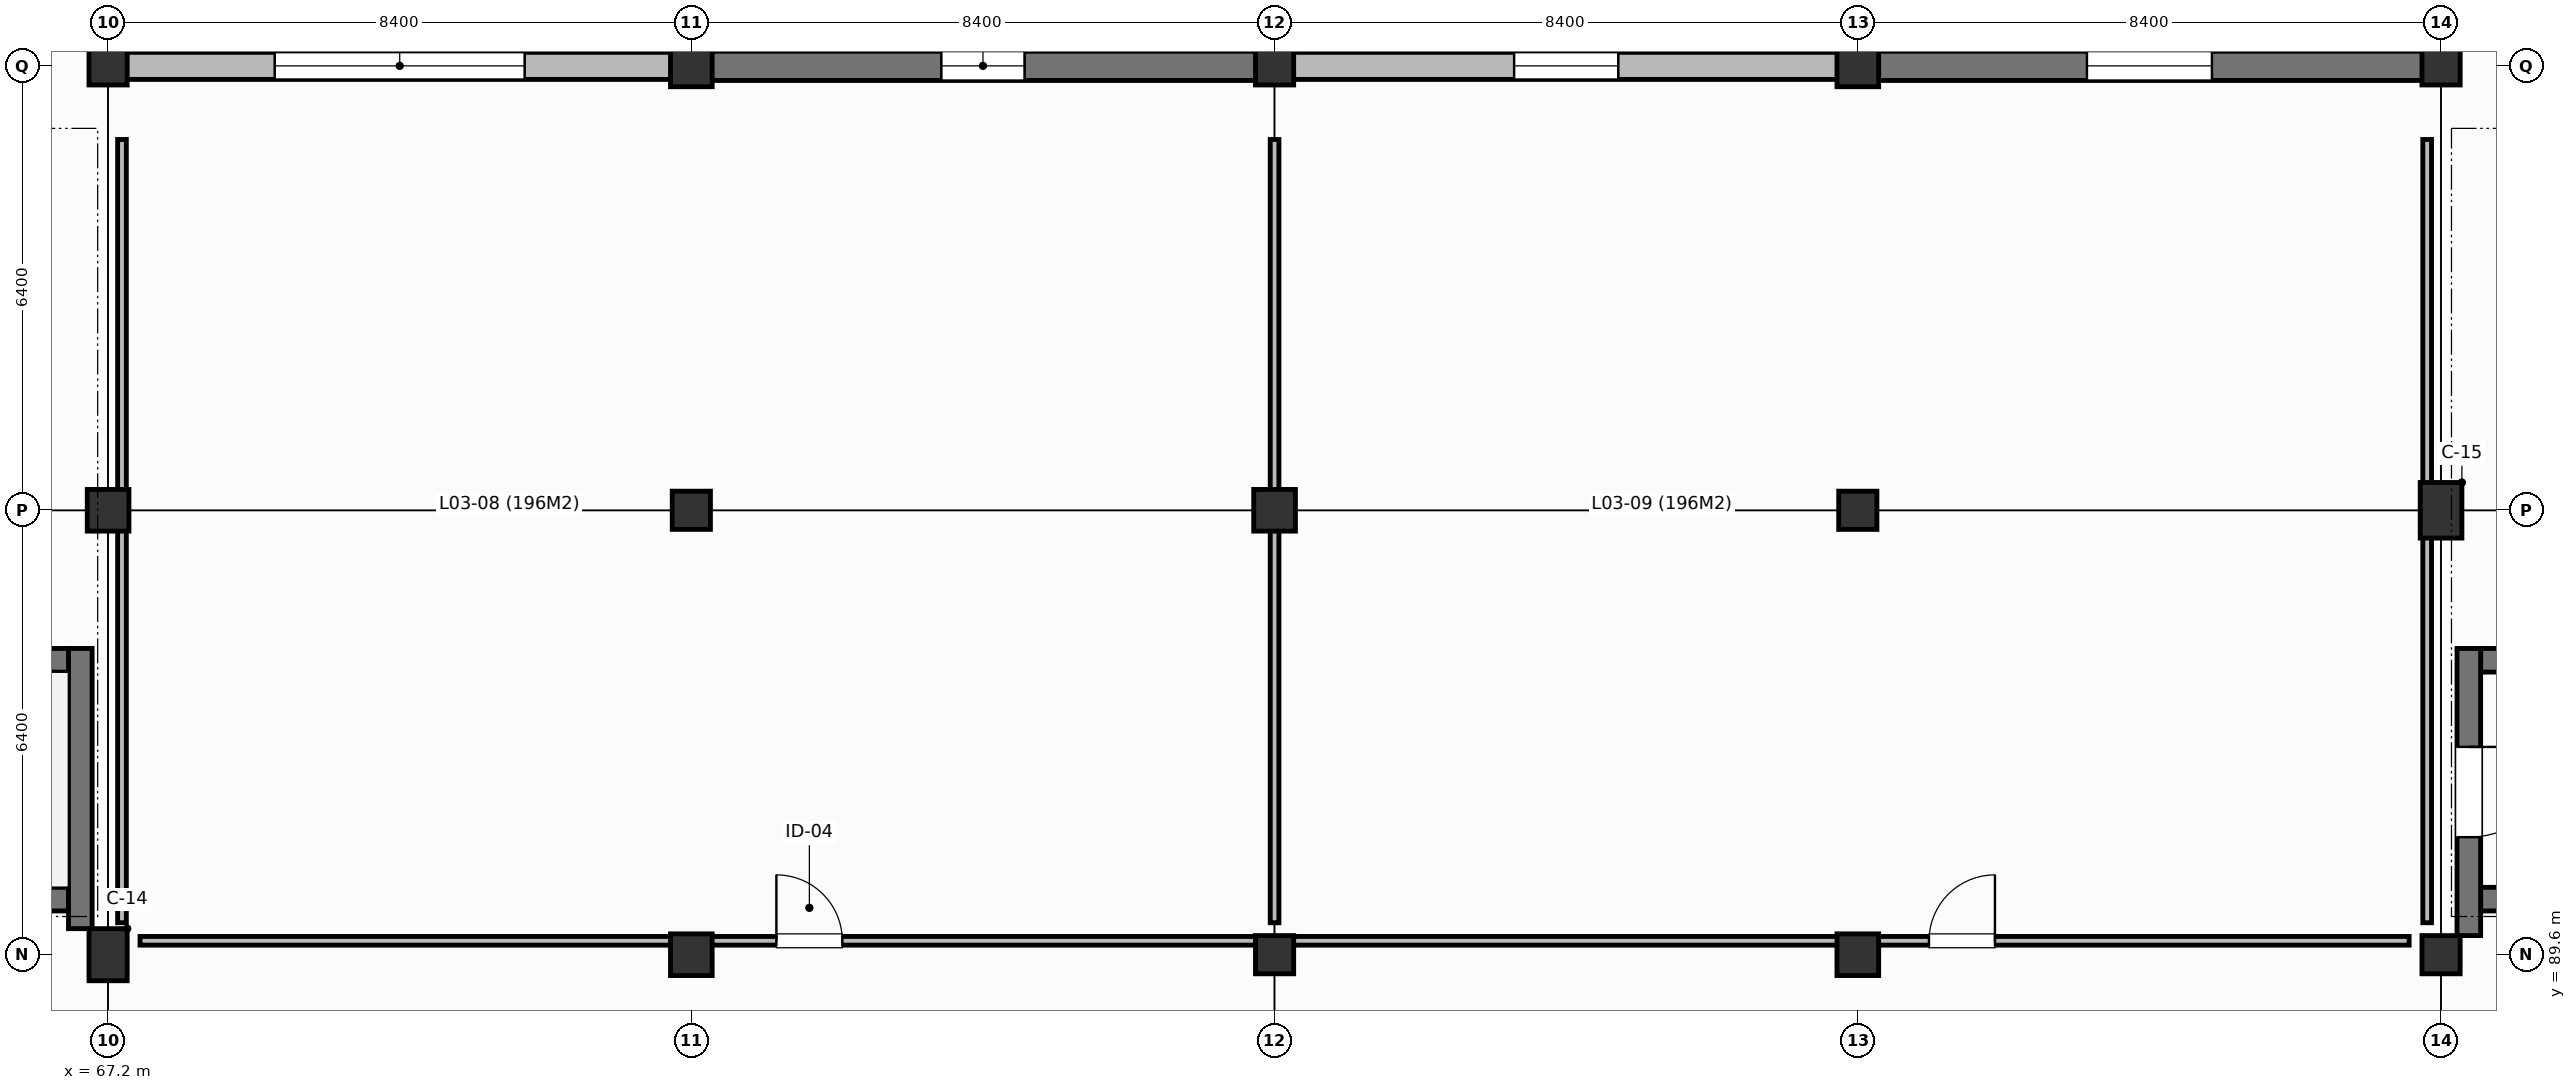
"""IFC4 building model, lengths in metres.
Left out: names, types, materials, properties, quantities, classifications, styles, units other than length and angle.
Written with IfcOpenShell. Run it as: python <this file> out.ifc"""

import sys

from ifc_helpers import new_model, si_unit, direction, frame, frame_2d, origin, origin_2d, place, context, subcontext, project, spatial, rectangle, extrude, element, fill, save


model = new_model("IFC4")
c1 = context("Model", 3, precision=1e-05, world=origin(), true_north=direction((0.0, 1.0)))
c2 = subcontext(c1, "Body", "Model", "MODEL_VIEW")
j1 = project(units=[si_unit("LENGTHUNIT", "METRE"), si_unit("PLANEANGLEUNIT", "RADIAN")], contexts=[c1])
p1 = place(None, origin())
s1 = spatial("IfcSite", under=j1, at=p1, CompositionType="ELEMENT")
p2 = place(p1, origin())
s2 = spatial("IfcBuilding", under=s1, at=p2, CompositionType="ELEMENT")
p3 = place(p2, frame((0.0, 0.0, 13.2)))
s3 = spatial("IfcBuildingStorey", under=s2, at=p3, CompositionType="ELEMENT", Elevation=13.2)
p4 = place(p3, frame((67.2, 89.6, 0.0), z_axis=(0.0, 0.0, 1.0), x_axis=(1.0, 0.0, 0.0)))
e1 = element("IfcColumn", 1, at=p4, inside=s3, PredefinedType="COLUMN", context=c2, shape_type="SweptSolid", body=[
    extrude(rectangle(XDim=0.55, YDim=0.75, at=origin_2d()), origin(), (0.0, 0.0, 1.0), 4.2),
])
p5 = place(p3, frame((67.2, 96.0, 0.0), z_axis=(0.0, 0.0, 1.0), x_axis=(1.0, 0.0, 0.0)))
e2 = element("IfcColumn", 2, at=p5, inside=s3, PredefinedType="COLUMN", context=c2, shape_type="SweptSolid", body=[
    extrude(rectangle(XDim=0.6, YDim=0.6, at=origin_2d()), origin(), (0.0, 0.0, 1.0), 4.2),
])
p6 = place(p3, frame((67.2, 102.4, 0.0), z_axis=(0.0, 0.0, 1.0), x_axis=(1.0, 0.0, 0.0)))
e3 = element("IfcColumn", 3, at=p6, inside=s3, PredefinedType="COLUMN", context=c2, shape_type="SweptSolid", body=[
    extrude(rectangle(XDim=0.55, YDim=0.55, at=origin_2d()), origin(), (0.0, 0.0, 1.0), 4.2),
])
p7 = place(p3, frame((75.6, 89.6, 0.0), z_axis=(0.0, 0.0, 1.0), x_axis=(1.0, 0.0, 0.0)))
e4 = element("IfcColumn", 4, at=p7, inside=s3, PredefinedType="COLUMN", context=c2, shape_type="SweptSolid", body=[
    extrude(rectangle(XDim=0.6, YDim=0.6, at=origin_2d()), origin(), (0.0, 0.0, 1.0), 4.2),
])
p8 = place(p3, frame((75.6, 96.0, 0.0), z_axis=(0.0, 0.0, 1.0), x_axis=(1.0, 0.0, 0.0)))
e5 = element("IfcColumn", 5, at=p8, inside=s3, PredefinedType="COLUMN", context=c2, shape_type="SweptSolid", body=[
    extrude(rectangle(XDim=0.55, YDim=0.55, at=origin_2d()), origin(), (0.0, 0.0, 1.0), 4.2),
])
p9 = place(p3, frame((75.6, 102.4, 0.0), z_axis=(0.0, 0.0, 1.0), x_axis=(1.0, 0.0, 0.0)))
e6 = element("IfcColumn", 6, at=p9, inside=s3, PredefinedType="COLUMN", context=c2, shape_type="SweptSolid", body=[
    extrude(rectangle(XDim=0.6, YDim=0.6, at=origin_2d()), origin(), (0.0, 0.0, 1.0), 4.2),
])
p10 = place(p3, frame((84.0, 89.6, 0.0), z_axis=(0.0, 0.0, 1.0), x_axis=(1.0, 0.0, 0.0)))
e7 = element("IfcColumn", 7, at=p10, inside=s3, PredefinedType="COLUMN", context=c2, shape_type="SweptSolid", body=[
    extrude(rectangle(XDim=0.55, YDim=0.55, at=origin_2d()), origin(), (0.0, 0.0, 1.0), 4.2),
])
p11 = place(p3, frame((84.0, 96.0, 0.0), z_axis=(0.0, 0.0, 1.0), x_axis=(1.0, 0.0, 0.0)))
e8 = element("IfcColumn", 8, at=p11, inside=s3, PredefinedType="COLUMN", context=c2, shape_type="SweptSolid", body=[
    extrude(rectangle(XDim=0.6, YDim=0.6, at=origin_2d()), origin(), (0.0, 0.0, 1.0), 4.2),
])
p12 = place(p3, frame((84.0, 102.4, 0.0), z_axis=(0.0, 0.0, 1.0), x_axis=(1.0, 0.0, 0.0)))
e9 = element("IfcColumn", 9, at=p12, inside=s3, PredefinedType="COLUMN", context=c2, shape_type="SweptSolid", body=[
    extrude(rectangle(XDim=0.55, YDim=0.55, at=origin_2d()), origin(), (0.0, 0.0, 1.0), 4.2),
])
p13 = place(p3, frame((92.4, 89.6, 0.0), z_axis=(0.0, 0.0, 1.0), x_axis=(1.0, 0.0, 0.0)))
e10 = element("IfcColumn", 10, at=p13, inside=s3, PredefinedType="COLUMN", context=c2, shape_type="SweptSolid", body=[
    extrude(rectangle(XDim=0.6, YDim=0.6, at=origin_2d()), origin(), (0.0, 0.0, 1.0), 4.2),
])
p14 = place(p3, frame((92.4, 96.0, 0.0), z_axis=(0.0, 0.0, 1.0), x_axis=(1.0, 0.0, 0.0)))
e11 = element("IfcColumn", 11, at=p14, inside=s3, PredefinedType="COLUMN", context=c2, shape_type="SweptSolid", body=[
    extrude(rectangle(XDim=0.55, YDim=0.55, at=origin_2d()), origin(), (0.0, 0.0, 1.0), 4.2),
])
p15 = place(p3, frame((92.4, 102.4, 0.0), z_axis=(0.0, 0.0, 1.0), x_axis=(1.0, 0.0, 0.0)))
e12 = element("IfcColumn", 12, at=p15, inside=s3, PredefinedType="COLUMN", context=c2, shape_type="SweptSolid", body=[
    extrude(rectangle(XDim=0.6, YDim=0.6, at=origin_2d()), origin(), (0.0, 0.0, 1.0), 4.2),
])
p16 = place(p3, frame((100.8, 89.6, 0.0), z_axis=(0.0, 0.0, 1.0), x_axis=(1.0, 0.0, 0.0)))
e13 = element("IfcColumn", 13, at=p16, inside=s3, PredefinedType="COLUMN", context=c2, shape_type="SweptSolid", body=[
    extrude(rectangle(XDim=0.55, YDim=0.55, at=origin_2d()), origin(), (0.0, 0.0, 1.0), 4.2),
])
p17 = place(p3, frame((100.8, 96.0, 0.0), z_axis=(0.0, 0.0, 1.0), x_axis=(1.0, 0.0, 0.0)))
e14 = element("IfcColumn", 14, at=p17, inside=s3, PredefinedType="COLUMN", context=c2, shape_type="SweptSolid", body=[
    extrude(rectangle(XDim=0.6, YDim=0.8, at=origin_2d()), origin(), (0.0, 0.0, 1.0), 4.2),
])
p18 = place(p3, frame((100.8, 102.4, 0.0), z_axis=(0.0, 0.0, 1.0), x_axis=(1.0, 0.0, 0.0)))
e15 = element("IfcColumn", 15, at=p18, inside=s3, PredefinedType="COLUMN", context=c2, shape_type="SweptSolid", body=[
    extrude(rectangle(XDim=0.55, YDim=0.55, at=origin_2d()), origin(), (0.0, 0.0, 1.0), 4.2),
])
p19 = place(p3, frame((67.2, 108.8, 0.0), z_axis=(0.0, 0.0, 1.0), x_axis=(0.0, -1.0, 0.0)))
e16 = element("IfcWall", 16, at=p19, inside=s3, PredefinedType="STANDARD", context=c2, shape_type="SweptSolid", body=[
    extrude(rectangle(XDim=6.4, YDim=0.42, at=frame_2d((3.2, 0.0))), origin(), (0.0, 0.0, 1.0), 3.84),
])
p20 = place(p19, frame((1.6, 0.0, 0.8)))
e17 = element("IfcOpeningElement", 17, at=p20, cuts=e16, PredefinedType="OPENING", context=c2, shape_type="SweptSolid", body=[
    extrude(rectangle(XDim=3.2, YDim=1.6, at=frame_2d((1.6, 0.8))), frame((0.0, 0.22, 0.0), z_axis=(0.0, -1.0, 0.0), x_axis=(1.0, 0.0, 0.0)), (0.0, 0.0, 1.0), 0.44),
])
p21 = place(p3, frame((67.2, 102.4, 0.0), z_axis=(0.0, 0.0, 1.0), x_axis=(1.0, 0.0, 0.0)))
e18 = element("IfcWall", 18, at=p21, inside=s3, PredefinedType="STANDARD", context=c2, shape_type="SweptSolid", body=[
    extrude(rectangle(XDim=8.4, YDim=0.39, at=frame_2d((4.2, 0.0))), origin(), (0.0, 0.0, 1.0), 3.24),
])
p22 = place(p21, frame((2.4, 0.0, 0.8)))
e19 = element("IfcOpeningElement", 19, at=p22, cuts=e18, PredefinedType="OPENING", context=c2, shape_type="SweptSolid", body=[
    extrude(rectangle(XDim=3.6, YDim=1.6, at=frame_2d((1.8, 0.8))), frame((0.0, 0.205, 0.0), z_axis=(0.0, -1.0, 0.0), x_axis=(1.0, 0.0, 0.0)), (0.0, 0.0, 1.0), 0.41),
])
p23 = place(p3, frame((75.6, 102.4, 0.0), z_axis=(0.0, 0.0, 1.0), x_axis=(1.0, 0.0, 0.0)))
e20 = element("IfcWall", 20, at=p23, inside=s3, PredefinedType="STANDARD", context=c2, shape_type="SweptSolid", body=[
    extrude(rectangle(XDim=8.4, YDim=0.42, at=frame_2d((4.2, 0.0))), origin(), (0.0, 0.0, 1.0), 3.84),
])
p24 = place(p23, frame((3.6, 0.0, 0.8)))
e21 = element("IfcOpeningElement", 21, at=p24, cuts=e20, PredefinedType="OPENING", context=c2, shape_type="SweptSolid", body=[
    extrude(rectangle(XDim=1.2, YDim=1.65, at=frame_2d((0.6, 0.825))), frame((0.0, 0.22, 0.0), z_axis=(0.0, -1.0, 0.0), x_axis=(1.0, 0.0, 0.0)), (0.0, 0.0, 1.0), 0.44),
])
p25 = place(p3, frame((84.0, 102.4, 0.0), z_axis=(0.0, 0.0, 1.0), x_axis=(1.0, 0.0, 0.0)))
e22 = element("IfcWall", 22, at=p25, inside=s3, PredefinedType="STANDARD", context=c2, shape_type="SweptSolid", body=[
    extrude(rectangle(XDim=8.4, YDim=0.39, at=frame_2d((4.2, 0.0))), origin(), (0.0, 0.0, 1.0), 3.19),
])
p26 = place(p25, frame((3.45, 0.0, 0.8)))
e23 = element("IfcOpeningElement", 23, at=p26, cuts=e22, PredefinedType="OPENING", context=c2, shape_type="SweptSolid", body=[
    extrude(rectangle(XDim=1.5, YDim=1.65, at=frame_2d((0.75, 0.825))), frame((0.0, 0.205, 0.0), z_axis=(0.0, -1.0, 0.0), x_axis=(1.0, 0.0, 0.0)), (0.0, 0.0, 1.0), 0.41),
])
p27 = place(p3, frame((92.4, 102.4, 0.0), z_axis=(0.0, 0.0, 1.0), x_axis=(1.0, 0.0, 0.0)))
e24 = element("IfcWall", 24, at=p27, inside=s3, PredefinedType="STANDARD", context=c2, shape_type="SweptSolid", body=[
    extrude(rectangle(XDim=8.4, YDim=0.42, at=frame_2d((4.2, 0.0))), origin(), (0.0, 0.0, 1.0), 3.84),
])
p28 = place(p27, frame((3.3, 0.0, 0.8)))
e25 = element("IfcOpeningElement", 25, at=p28, cuts=e24, PredefinedType="OPENING", context=c2, shape_type="SweptSolid", body=[
    extrude(rectangle(XDim=1.8, YDim=1.65, at=frame_2d((0.9, 0.825))), frame((0.0, 0.22, 0.0), z_axis=(0.0, -1.0, 0.0), x_axis=(1.0, 0.0, 0.0)), (0.0, 0.0, 1.0), 0.44),
])
p29 = place(p3, frame((100.8, 102.4, 0.0), z_axis=(0.0, 0.0, 1.0), x_axis=(0.0, 1.0, 0.0)))
e26 = element("IfcWall", 26, at=p29, inside=s3, PredefinedType="STANDARD", context=c2, shape_type="SweptSolid", body=[
    extrude(rectangle(XDim=6.4, YDim=0.39, at=frame_2d((3.2, 0.0))), origin(), (0.0, 0.0, 1.0), 2.69),
])
p30 = place(p29, frame((2.15, 0.0, 0.8)))
e27 = element("IfcOpeningElement", 27, at=p30, cuts=e26, PredefinedType="OPENING", context=c2, shape_type="SweptSolid", body=[
    extrude(rectangle(XDim=2.1, YDim=1.65, at=frame_2d((1.05, 0.825))), frame((0.0, 0.205, 0.0), z_axis=(0.0, -1.0, 0.0), x_axis=(1.0, 0.0, 0.0)), (0.0, 0.0, 1.0), 0.41),
])
p31 = place(p3, frame((59.37, 90.4, 0.0), z_axis=(0.0, 0.0, 1.0), x_axis=(1.0, 0.0, 0.0)))
e28 = element("IfcWall", 28, at=p31, inside=s3, PredefinedType="SHEAR", context=c2, shape_type="SweptSolid", body=[
    extrude(rectangle(XDim=7.26, YDim=0.34, at=frame_2d((3.63, 0.0))), origin(), (0.0, 0.0, 1.0), 4.2),
])
p32 = place(p3, frame((66.8, 89.975, 0.0), z_axis=(0.0, 0.0, 1.0), x_axis=(0.0, 1.0, 0.0)))
e29 = element("IfcWall", 29, at=p32, inside=s3, PredefinedType="SHEAR", context=c2, shape_type="SweptSolid", body=[
    extrude(rectangle(XDim=4.035, YDim=0.34, at=frame_2d((2.018, 0.0))), origin(), (0.0, 0.0, 1.0), 4.2),
])
for number, where, z_axis, x_axis in (
    (30, (66.63, 93.84, 0.0), (0.0, 0.0, 1.0), (-1.0, 0.0, 0.0)),
    (31, (101.37, 90.4, 0.0), (0.0, 0.0, 1.0), (1.0, 0.0, 0.0)),
    (32, (108.63, 93.84, 0.0), (0.0, 0.0, 1.0), (-1.0, 0.0, 0.0)),
):
    element("IfcWall", number, at=place(p3, frame(where, z_axis=z_axis, x_axis=x_axis)), inside=s3, PredefinedType="SHEAR", context=c2, shape_type="SweptSolid", body=[
        extrude(rectangle(XDim=7.26, YDim=0.34, at=frame_2d((3.63, 0.0))), origin(), (0.0, 0.0, 1.0), 4.2),
    ])
p33 = place(p3, frame((101.2, 94.01, 0.0), z_axis=(0.0, 0.0, 1.0), x_axis=(0.0, -1.0, 0.0)))
e33 = element("IfcWall", 33, at=p33, inside=s3, PredefinedType="SHEAR", context=c2, shape_type="SweptSolid", body=[
    extrude(rectangle(XDim=4.135, YDim=0.34, at=frame_2d((2.067, 0.0))), origin(), (0.0, 0.0, 1.0), 4.2),
])
p34 = place(p33, frame((1.417, 0.0, 0.0)))
e34 = element("IfcOpeningElement", 34, at=p34, cuts=e33, PredefinedType="OPENING", context=c2, shape_type="SweptSolid", body=[
    extrude(rectangle(XDim=1.3, YDim=2.15, at=frame_2d((0.65, 1.075))), frame((0.0, 0.18, 0.0), z_axis=(0.0, -1.0, 0.0), x_axis=(1.0, 0.0, 0.0)), (0.0, 0.0, 1.0), 0.36),
])
p35 = place(p3, frame((67.66, 89.8, 0.0), z_axis=(0.0, 0.0, 1.0), x_axis=(1.0, 0.0, 0.0)))
e35 = element("IfcWall", 35, at=p35, inside=s3, PredefinedType="PARTITIONING", context=c2, shape_type="SweptSolid", body=[
    extrude(rectangle(XDim=16.08, YDim=0.125, at=frame_2d((8.04, 0.0))), origin(), (0.0, 0.0, 1.0), 2.915),
])
p36 = place(p35, frame((9.165, 0.0, 0.0)))
e36 = element("IfcOpeningElement", 36, at=p36, cuts=e35, PredefinedType="OPENING", context=c2, shape_type="SweptSolid", body=[
    extrude(rectangle(XDim=0.95, YDim=2.1, at=frame_2d((0.475, 1.05))), frame((0.0, 0.073, 0.0), z_axis=(0.0, -1.0, 0.0), x_axis=(1.0, 0.0, 0.0)), (0.0, 0.0, 1.0), 0.145),
])
p37 = place(p3, frame((84.0, 90.06, 0.0), z_axis=(0.0, 0.0, 1.0), x_axis=(0.0, 1.0, 0.0)))
e37 = element("IfcWall", 37, at=p37, inside=s3, PredefinedType="PARTITIONING", context=c2, shape_type="SweptSolid", body=[
    extrude(rectangle(XDim=11.28, YDim=0.125, at=frame_2d((5.64, 0.0))), origin(), (0.0, 0.0, 1.0), 2.865),
])
p38 = place(p3, frame((67.4, 101.34, 0.0), z_axis=(0.0, 0.0, 1.0), x_axis=(0.0, -1.0, 0.0)))
e38 = element("IfcWall", 38, at=p38, inside=s3, PredefinedType="PARTITIONING", context=c2, shape_type="SweptSolid", body=[
    extrude(rectangle(XDim=11.28, YDim=0.125, at=frame_2d((5.64, 0.0))), origin(), (0.0, 0.0, 1.0), 2.915),
])
p39 = place(p3, frame((84.26, 89.8, 0.0), z_axis=(0.0, 0.0, 1.0), x_axis=(1.0, 0.0, 0.0)))
e39 = element("IfcWall", 39, at=p39, inside=s3, PredefinedType="PARTITIONING", context=c2, shape_type="SweptSolid", body=[
    extrude(rectangle(XDim=16.08, YDim=0.125, at=frame_2d((8.04, 0.0))), origin(), (0.0, 0.0, 1.0), 3.165),
])
p40 = place(p39, frame((9.165, 0.0, 0.0)))
e40 = element("IfcOpeningElement", 40, at=p40, cuts=e39, PredefinedType="OPENING", context=c2, shape_type="SweptSolid", body=[
    extrude(rectangle(XDim=0.95, YDim=2.1, at=frame_2d((0.475, 1.05))), frame((0.0, 0.073, 0.0), z_axis=(0.0, -1.0, 0.0), x_axis=(1.0, 0.0, 0.0)), (0.0, 0.0, 1.0), 0.145),
])
p41 = place(p3, frame((100.6, 90.06, 0.0), z_axis=(0.0, 0.0, 1.0), x_axis=(0.0, 1.0, 0.0)))
e41 = element("IfcWall", 41, at=p41, inside=s3, PredefinedType="PARTITIONING", context=c2, shape_type="SweptSolid", body=[
    extrude(rectangle(XDim=11.28, YDim=0.125, at=frame_2d((5.64, 0.0))), origin(), (0.0, 0.0, 1.0), 2.715),
])
p42 = place(p22, origin())
e42 = element("IfcWindow", 42, at=p42, inside=s3, PartitioningType="TRIPLE_PANEL_VERTICAL", PredefinedType="WINDOW", context=c2, shape_type="SweptSolid", body=[
    extrude(rectangle(XDim=3.6, YDim=1.6, at=frame_2d((1.8, 0.8))), frame((0.0, 0.03, 0.0), z_axis=(0.0, -1.0, 0.0), x_axis=(1.0, 0.0, 0.0)), (0.0, 0.0, 1.0), 0.06),
])
fill(e19, e42)
p43 = place(p24, origin())
e43 = element("IfcWindow", 43, at=p43, inside=s3, PartitioningType="SINGLE_PANEL", PredefinedType="WINDOW", context=c2, shape_type="SweptSolid", body=[
    extrude(rectangle(XDim=1.2, YDim=1.65, at=frame_2d((0.6, 0.825))), frame((0.0, 0.03, 0.0), z_axis=(0.0, -1.0, 0.0), x_axis=(1.0, 0.0, 0.0)), (0.0, 0.0, 1.0), 0.06),
])
fill(e21, e43)
p44 = place(p26, origin())
e44 = element("IfcWindow", 44, at=p44, inside=s3, PartitioningType="SINGLE_PANEL", PredefinedType="WINDOW", context=c2, shape_type="SweptSolid", body=[
    extrude(rectangle(XDim=1.5, YDim=1.65, at=frame_2d((0.75, 0.825))), frame((0.0, 0.03, 0.0), z_axis=(0.0, -1.0, 0.0), x_axis=(1.0, 0.0, 0.0)), (0.0, 0.0, 1.0), 0.06),
])
fill(e23, e44)
p45 = place(p28, origin())
e45 = element("IfcWindow", 45, at=p45, inside=s3, PartitioningType="SINGLE_PANEL", PredefinedType="WINDOW", context=c2, shape_type="SweptSolid", body=[
    extrude(rectangle(XDim=1.8, YDim=1.65, at=frame_2d((0.9, 0.825))), frame((0.0, 0.03, 0.0), z_axis=(0.0, -1.0, 0.0), x_axis=(1.0, 0.0, 0.0)), (0.0, 0.0, 1.0), 0.06),
])
fill(e25, e45)
p46 = place(p34, origin())
e46 = element("IfcDoor", 46, at=p46, inside=s3, OperationType="SINGLE_SWING_LEFT", PredefinedType="DOOR", context=c2, shape_type="SweptSolid", body=[
    extrude(rectangle(XDim=1.3, YDim=2.15, at=frame_2d((0.65, 1.075))), frame((0.0, 0.025, 0.0), z_axis=(0.0, -1.0, 0.0), x_axis=(1.0, 0.0, 0.0)), (0.0, 0.0, 1.0), 0.05),
])
fill(e34, e46)
p47 = place(p36, origin())
e47 = element("IfcDoor", 47, at=p47, inside=s3, OperationType="SINGLE_SWING_LEFT", PredefinedType="DOOR", context=c2, shape_type="SweptSolid", body=[
    extrude(rectangle(XDim=0.95, YDim=2.1, at=frame_2d((0.475, 1.05))), frame((0.0, 0.025, 0.0), z_axis=(0.0, -1.0, 0.0), x_axis=(1.0, 0.0, 0.0)), (0.0, 0.0, 1.0), 0.05),
])
fill(e36, e47)
p48 = place(p40, origin())
e48 = element("IfcDoor", 48, at=p48, inside=s3, OperationType="SINGLE_SWING_RIGHT", PredefinedType="DOOR", context=c2, shape_type="SweptSolid", body=[
    extrude(rectangle(XDim=0.95, YDim=2.1, at=frame_2d((0.475, 1.05))), frame((0.0, 0.025, 0.0), z_axis=(0.0, -1.0, 0.0), x_axis=(1.0, 0.0, 0.0)), (0.0, 0.0, 1.0), 0.05),
])
fill(e40, e48)
save(model, sys.argv[1])
